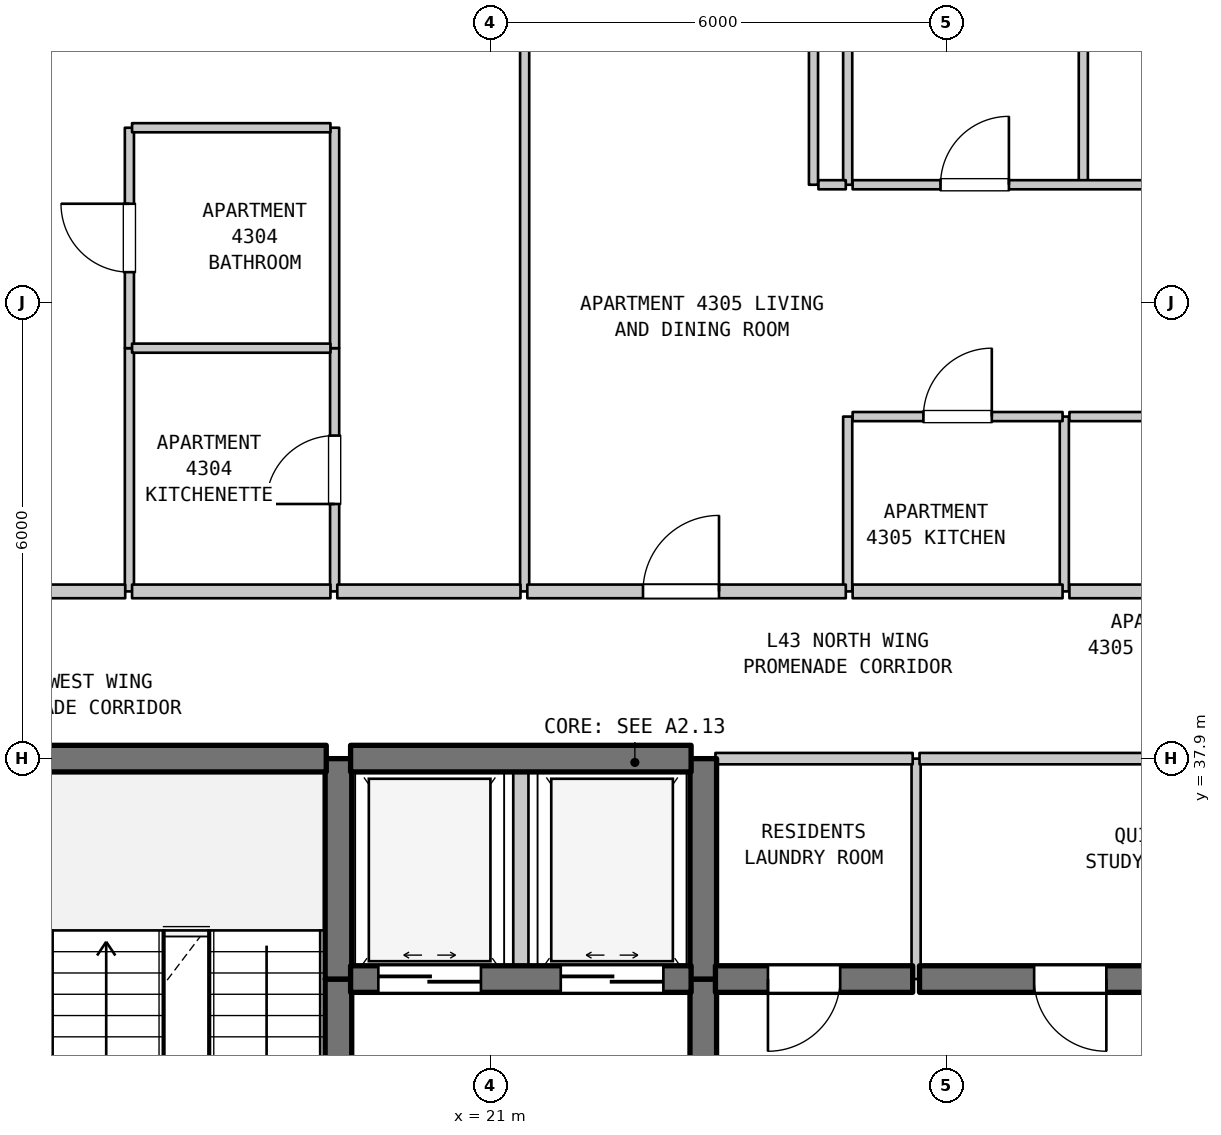
"""IFC4 building model, lengths in metres.
Left out: names, types, materials, properties, quantities, classifications, styles, units other than length and angle.
Written with IfcOpenShell. Run it as: python <this file> out.ifc"""

import sys

from ifc_helpers import new_model, si_unit, direction, frame, frame_2d, origin, place, context, subcontext, project, spatial, rectangle, extrude, element, fill, save


model = new_model("IFC4")
c1 = context("Model", 3, precision=1e-05, world=origin(), true_north=direction((0.0, 1.0)))
c2 = subcontext(c1, "Body", "Model", "MODEL_VIEW")
j1 = project(units=[si_unit("LENGTHUNIT", "METRE"), si_unit("PLANEANGLEUNIT", "RADIAN")], contexts=[c1])
p1 = place(None, origin())
s1 = spatial("IfcSite", under=j1, at=p1, CompositionType="ELEMENT")
p2 = place(p1, origin())
s2 = spatial("IfcBuilding", under=s1, at=p2, CompositionType="ELEMENT")
p3 = place(p2, frame((0.0, 0.0, 176.5)))
s3 = spatial("IfcBuildingStorey", under=s2, at=p3, CompositionType="ELEMENT", Elevation=176.5)
p4 = place(p3, frame((16.25, 40.1, 0.0), z_axis=(0.0, 0.0, 1.0), x_axis=(0.0, 1.0, 0.0)))
e1 = element("IfcWall", 1, at=p4, inside=s3, PredefinedType="PARTITIONING", context=c2, shape_type="SweptSolid", body=[
    extrude(rectangle(XDim=3.2, YDim=0.12, at=frame_2d((1.6, 0.0))), origin(), (0.0, 0.0, 1.0), 3.39),
])
p5 = place(p3, frame((16.25, 43.3, 0.0), z_axis=(0.0, 0.0, 1.0), x_axis=(0.0, 1.0, 0.0)))
e2 = element("IfcWall", 2, at=p5, inside=s3, PredefinedType="PARTITIONING", context=c2, shape_type="SweptSolid", body=[
    extrude(rectangle(XDim=2.9, YDim=0.12, at=frame_2d((1.45, 0.0))), origin(), (0.0, 0.0, 1.0), 3.39),
])
p6 = place(p5, frame((1.0, 0.0, 0.0)))
e3 = element("IfcOpeningElement", 3, at=p6, cuts=e2, PredefinedType="OPENING", context=c2, shape_type="SweptSolid", body=[
    extrude(rectangle(XDim=0.9, YDim=2.1, at=frame_2d((0.45, 1.05))), frame((0.0, 0.07, 0.0), z_axis=(0.0, -1.0, 0.0), x_axis=(1.0, 0.0, 0.0)), (0.0, 0.0, 1.0), 0.14),
])
p7 = place(p3, frame((18.95, 40.1, 0.0), z_axis=(0.0, 0.0, 1.0), x_axis=(0.0, 1.0, 0.0)))
e4 = element("IfcWall", 4, at=p7, inside=s3, PredefinedType="PARTITIONING", context=c2, shape_type="SweptSolid", body=[
    extrude(rectangle(XDim=3.2, YDim=0.12, at=frame_2d((1.6, 0.0))), origin(), (0.0, 0.0, 1.0), 3.39),
])
p8 = place(p7, frame((1.15, 0.0, 0.0)))
e5 = element("IfcOpeningElement", 5, at=p8, cuts=e4, PredefinedType="OPENING", context=c2, shape_type="SweptSolid", body=[
    extrude(rectangle(XDim=0.9, YDim=2.15, at=frame_2d((0.45, 1.075))), frame((0.0, 0.07, 0.0), z_axis=(0.0, -1.0, 0.0), x_axis=(1.0, 0.0, 0.0)), (0.0, 0.0, 1.0), 0.14),
])
p9 = place(p3, frame((18.95, 43.3, 0.0), z_axis=(0.0, 0.0, 1.0), x_axis=(0.0, 1.0, 0.0)))
e6 = element("IfcWall", 6, at=p9, inside=s3, PredefinedType="PARTITIONING", context=c2, shape_type="SweptSolid", body=[
    extrude(rectangle(XDim=2.9, YDim=0.12, at=frame_2d((1.45, 0.0))), origin(), (0.0, 0.0, 1.0), 3.39),
])
p10 = place(p3, frame((19.0, 29.5, 0.0), z_axis=(0.0, 0.0, 1.0), x_axis=(0.0, 1.0, 0.0)))
e7 = element("IfcWall", 7, at=p10, inside=s3, PredefinedType="SHEAR", context=c2, shape_type="SweptSolid", body=[
    extrude(rectangle(XDim=5.5, YDim=0.35, at=frame_2d((2.75, 0.0))), origin(), (0.0, 0.0, 1.0), 3.39),
])
p11 = place(p10, frame((2.025, 0.0, 0.0)))
e8 = element("IfcOpeningElement", 8, at=p11, cuts=e7, PredefinedType="OPENING", context=c2, shape_type="SweptSolid", body=[
    extrude(rectangle(XDim=1.1, YDim=2.15, at=frame_2d((0.55, 1.075))), frame((0.0, 0.185, 0.0), z_axis=(0.0, -1.0, 0.0), x_axis=(1.0, 0.0, 0.0)), (0.0, 0.0, 1.0), 0.37),
])
p12 = place(p3, frame((19.0, 35.0, 0.0), z_axis=(0.0, 0.0, 1.0), x_axis=(0.0, 1.0, 0.0)))
e9 = element("IfcWall", 9, at=p12, inside=s3, PredefinedType="SHEAR", context=c2, shape_type="SweptSolid", body=[
    extrude(rectangle(XDim=2.9, YDim=0.35, at=frame_2d((1.45, 0.0))), origin(), (0.0, 0.0, 1.0), 3.39),
])
p13 = place(p3, frame((21.4, 35.0, 0.0), z_axis=(0.0, 0.0, 1.0), x_axis=(0.0, 1.0, 0.0)))
e10 = element("IfcWall", 10, at=p13, inside=s3, PredefinedType="STANDARD", context=c2, shape_type="SweptSolid", body=[
    extrude(rectangle(XDim=2.9, YDim=0.2, at=frame_2d((1.45, 0.0))), origin(), (0.0, 0.0, 1.0), 3.39),
])
p14 = place(p3, frame((21.45, 40.1, 0.0), z_axis=(0.0, 0.0, 1.0), x_axis=(0.0, 1.0, 0.0)))
e11 = element("IfcWall", 11, at=p14, inside=s3, PredefinedType="PARTITIONING", context=c2, shape_type="SweptSolid", body=[
    extrude(rectangle(XDim=13.79, YDim=0.12, at=frame_2d((6.895, 0.0))), origin(), (0.0, 0.0, 1.0), 3.39),
])
p15 = place(p3, frame((23.8, 31.5, 0.0), z_axis=(0.0, 0.0, 1.0), x_axis=(0.0, 1.0, 0.0)))
e12 = element("IfcWall", 12, at=p15, inside=s3, PredefinedType="SHEAR", context=c2, shape_type="SweptSolid", body=[
    extrude(rectangle(XDim=3.5, YDim=0.35, at=frame_2d((1.75, 0.0))), origin(), (0.0, 0.0, 1.0), 3.39),
])
p16 = place(p15, frame((1.127, 0.0, 0.0)))
e13 = element("IfcOpeningElement", 13, at=p16, cuts=e12, PredefinedType="OPENING", context=c2, shape_type="SweptSolid", body=[
    extrude(rectangle(XDim=1.1, YDim=2.15, at=frame_2d((0.55, 1.075))), frame((0.0, 0.185, 0.0), z_axis=(0.0, -1.0, 0.0), x_axis=(1.0, 0.0, 0.0)), (0.0, 0.0, 1.0), 0.37),
])
p17 = place(p3, frame((23.8, 35.0, 0.0), z_axis=(0.0, 0.0, 1.0), x_axis=(0.0, 1.0, 0.0)))
e14 = element("IfcWall", 14, at=p17, inside=s3, PredefinedType="SHEAR", context=c2, shape_type="SweptSolid", body=[
    extrude(rectangle(XDim=2.9, YDim=0.35, at=frame_2d((1.45, 0.0))), origin(), (0.0, 0.0, 1.0), 3.39),
])
p18 = place(p3, frame((25.25, 45.45, 0.0), z_axis=(0.0, 0.0, 1.0), x_axis=(0.0, 1.0, 0.0)))
e15 = element("IfcWall", 15, at=p18, inside=s3, PredefinedType="PARTITIONING", context=c2, shape_type="SweptSolid", body=[
    extrude(rectangle(XDim=8.44, YDim=0.12, at=frame_2d((4.22, 0.0))), origin(), (0.0, 0.0, 1.0), 3.39),
])
p19 = place(p3, frame((25.7, 40.1, 0.0), z_axis=(0.0, 0.0, 1.0), x_axis=(0.0, 1.0, 0.0)))
e16 = element("IfcWall", 16, at=p19, inside=s3, PredefinedType="PARTITIONING", context=c2, shape_type="SweptSolid", body=[
    extrude(rectangle(XDim=2.3, YDim=0.12, at=frame_2d((1.15, 0.0))), origin(), (0.0, 0.0, 1.0), 3.39),
])
p20 = place(p3, frame((25.7, 45.45, 0.0), z_axis=(0.0, 0.0, 1.0), x_axis=(0.0, 1.0, 0.0)))
e17 = element("IfcWall", 17, at=p20, inside=s3, PredefinedType="PARTITIONING", context=c2, shape_type="SweptSolid", body=[
    extrude(rectangle(XDim=8.44, YDim=0.12, at=frame_2d((4.22, 0.0))), origin(), (0.0, 0.0, 1.0), 3.39),
])
p21 = place(p3, frame((26.6, 35.0, 0.0), z_axis=(0.0, 0.0, 1.0), x_axis=(0.0, 1.0, 0.0)))
e18 = element("IfcWall", 18, at=p21, inside=s3, PredefinedType="PARTITIONING", context=c2, shape_type="SweptSolid", body=[
    extrude(rectangle(XDim=2.9, YDim=0.12, at=frame_2d((1.45, 0.0))), origin(), (0.0, 0.0, 1.0), 3.39),
])
p22 = place(p3, frame((28.55, 40.1, 0.0), z_axis=(0.0, 0.0, 1.0), x_axis=(0.0, 1.0, 0.0)))
e19 = element("IfcWall", 19, at=p22, inside=s3, PredefinedType="PARTITIONING", context=c2, shape_type="SweptSolid", body=[
    extrude(rectangle(XDim=2.3, YDim=0.12, at=frame_2d((1.15, 0.0))), origin(), (0.0, 0.0, 1.0), 3.39),
])
p23 = place(p3, frame((28.8, 45.45, 0.0), z_axis=(0.0, 0.0, 1.0), x_axis=(0.0, 1.0, 0.0)))
e20 = element("IfcWall", 20, at=p23, inside=s3, PredefinedType="PARTITIONING", context=c2, shape_type="SweptSolid", body=[
    extrude(rectangle(XDim=8.44, YDim=0.12, at=frame_2d((4.22, 0.0))), origin(), (0.0, 0.0, 1.0), 3.39),
])
p24 = place(p3, frame((19.16, 35.0, 0.0), z_axis=(0.0, 0.0, 1.0), x_axis=(1.0, 0.0, 0.0)))
e21 = element("IfcWall", 21, at=p24, inside=s3, PredefinedType="SHEAR", context=c2, shape_type="SweptSolid", body=[
    extrude(rectangle(XDim=4.48, YDim=0.35, at=frame_2d((2.24, 0.0))), origin(), (0.0, 0.0, 1.0), 3.39),
])
p25 = place(p24, frame((0.365, 0.0, 0.0)))
e22 = element("IfcOpeningElement", 22, at=p25, cuts=e21, PredefinedType="OPENING", context=c2, shape_type="SweptSolid", body=[
    extrude(rectangle(XDim=1.35, YDim=2.2, at=frame_2d((0.675, 1.1))), frame((0.0, 0.185, 0.0), z_axis=(0.0, -1.0, 0.0), x_axis=(1.0, 0.0, 0.0)), (0.0, 0.0, 1.0), 0.37),
])
p26 = place(p24, frame((2.765, 0.0, 0.0)))
e23 = element("IfcOpeningElement", 23, at=p26, cuts=e21, PredefinedType="OPENING", context=c2, shape_type="SweptSolid", body=[
    extrude(rectangle(XDim=1.35, YDim=2.2, at=frame_2d((0.675, 1.1))), frame((0.0, 0.185, 0.0), z_axis=(0.0, -1.0, 0.0), x_axis=(1.0, 0.0, 0.0)), (0.0, 0.0, 1.0), 0.37),
])
p27 = place(p3, frame((23.96, 35.0, 0.0), z_axis=(0.0, 0.0, 1.0), x_axis=(1.0, 0.0, 0.0)))
e24 = element("IfcWall", 24, at=p27, inside=s3, PredefinedType="SHEAR", context=c2, shape_type="SweptSolid", body=[
    extrude(rectangle(XDim=2.595, YDim=0.35, at=frame_2d((1.297, 0.0))), origin(), (0.0, 0.0, 1.0), 3.39),
])
p28 = place(p27, frame((0.691, 0.0, 0.0)))
e25 = element("IfcOpeningElement", 25, at=p28, cuts=e24, PredefinedType="OPENING", context=c2, shape_type="SweptSolid", body=[
    extrude(rectangle(XDim=0.95, YDim=2.15, at=frame_2d((0.475, 1.075))), frame((0.0, 0.185, 0.0), z_axis=(0.0, -1.0, 0.0), x_axis=(1.0, 0.0, 0.0)), (0.0, 0.0, 1.0), 0.37),
])
p29 = place(p3, frame((26.645, 35.0, 0.0), z_axis=(0.0, 0.0, 1.0), x_axis=(1.0, 0.0, 0.0)))
e26 = element("IfcWall", 26, at=p29, inside=s3, PredefinedType="SHEAR", context=c2, shape_type="SweptSolid", body=[
    extrude(rectangle(XDim=3.995, YDim=0.35, at=frame_2d((1.998, 0.0))), origin(), (0.0, 0.0, 1.0), 3.39),
])
p30 = place(p29, frame((1.508, 0.0, 0.0)))
e27 = element("IfcOpeningElement", 27, at=p30, cuts=e26, PredefinedType="OPENING", context=c2, shape_type="SweptSolid", body=[
    extrude(rectangle(XDim=0.95, YDim=2.15, at=frame_2d((0.475, 1.075))), frame((0.0, 0.185, 0.0), z_axis=(0.0, -1.0, 0.0), x_axis=(1.0, 0.0, 0.0)), (0.0, 0.0, 1.0), 0.37),
])
p31 = place(p3, frame((15.16, 37.9, 0.0), z_axis=(0.0, 0.0, 1.0), x_axis=(1.0, 0.0, 0.0)))
e28 = element("IfcWall", 28, at=p31, inside=s3, PredefinedType="SHEAR", context=c2, shape_type="SweptSolid", body=[
    extrude(rectangle(XDim=3.68, YDim=0.35, at=frame_2d((1.84, 0.0))), origin(), (0.0, 0.0, 1.0), 3.39),
])
p32 = place(p3, frame((19.16, 37.9, 0.0), z_axis=(0.0, 0.0, 1.0), x_axis=(1.0, 0.0, 0.0)))
e29 = element("IfcWall", 29, at=p32, inside=s3, PredefinedType="SHEAR", context=c2, shape_type="SweptSolid", body=[
    extrude(rectangle(XDim=4.48, YDim=0.35, at=frame_2d((2.24, 0.0))), origin(), (0.0, 0.0, 1.0), 3.39),
])
p33 = place(p3, frame((23.96, 37.9, 0.0), z_axis=(0.0, 0.0, 1.0), x_axis=(1.0, 0.0, 0.0)))
e30 = element("IfcWall", 30, at=p33, inside=s3, PredefinedType="STANDARD", context=c2, shape_type="SweptSolid", body=[
    extrude(rectangle(XDim=2.595, YDim=0.15, at=frame_2d((1.297, 0.0))), origin(), (0.0, 0.0, 1.0), 2.89),
])
p34 = place(p3, frame((26.645, 37.9, 0.0), z_axis=(0.0, 0.0, 1.0), x_axis=(1.0, 0.0, 0.0)))
e31 = element("IfcWall", 31, at=p34, inside=s3, PredefinedType="STANDARD", context=c2, shape_type="SweptSolid", body=[
    extrude(rectangle(XDim=4.095, YDim=0.15, at=frame_2d((2.047, 0.0))), origin(), (0.0, 0.0, 1.0), 2.89),
])
p35 = place(p3, frame((12.875, 40.1, 0.0), z_axis=(0.0, 0.0, 1.0), x_axis=(1.0, 0.0, 0.0)))
e32 = element("IfcWall", 32, at=p35, inside=s3, PredefinedType="STANDARD", context=c2, shape_type="SweptSolid", body=[
    extrude(rectangle(XDim=3.32, YDim=0.18, at=frame_2d((1.66, 0.0))), origin(), (0.0, 0.0, 1.0), 3.39),
])
p36 = place(p35, frame((1.071, 0.0, 0.0)))
e33 = element("IfcOpeningElement", 33, at=p36, cuts=e32, PredefinedType="OPENING", context=c2, shape_type="SweptSolid", body=[
    extrude(rectangle(XDim=1.0, YDim=2.15, at=frame_2d((0.5, 1.075))), frame((0.0, 0.1, 0.0), z_axis=(0.0, -1.0, 0.0), x_axis=(1.0, 0.0, 0.0)), (0.0, 0.0, 1.0), 0.2),
])
p37 = place(p3, frame((16.285, 40.1, 0.0), z_axis=(0.0, 0.0, 1.0), x_axis=(1.0, 0.0, 0.0)))
e34 = element("IfcWall", 34, at=p37, inside=s3, PredefinedType="STANDARD", context=c2, shape_type="SweptSolid", body=[
    extrude(rectangle(XDim=2.61, YDim=0.18, at=frame_2d((1.305, 0.0))), origin(), (0.0, 0.0, 1.0), 3.39),
])
p38 = place(p3, frame((18.985, 40.1, 0.0), z_axis=(0.0, 0.0, 1.0), x_axis=(1.0, 0.0, 0.0)))
e35 = element("IfcWall", 35, at=p38, inside=s3, PredefinedType="STANDARD", context=c2, shape_type="SweptSolid", body=[
    extrude(rectangle(XDim=2.41, YDim=0.18, at=frame_2d((1.205, 0.0))), origin(), (0.0, 0.0, 1.0), 3.39),
])
p39 = place(p3, frame((21.485, 40.1, 0.0), z_axis=(0.0, 0.0, 1.0), x_axis=(1.0, 0.0, 0.0)))
e36 = element("IfcWall", 36, at=p39, inside=s3, PredefinedType="STANDARD", context=c2, shape_type="SweptSolid", body=[
    extrude(rectangle(XDim=4.19, YDim=0.18, at=frame_2d((2.095, 0.0))), origin(), (0.0, 0.0, 1.0), 3.39),
])
p40 = place(p39, frame((1.522, 0.0, 0.0)))
e37 = element("IfcOpeningElement", 37, at=p40, cuts=e36, PredefinedType="OPENING", context=c2, shape_type="SweptSolid", body=[
    extrude(rectangle(XDim=1.0, YDim=2.15, at=frame_2d((0.5, 1.075))), frame((0.0, 0.1, 0.0), z_axis=(0.0, -1.0, 0.0), x_axis=(1.0, 0.0, 0.0)), (0.0, 0.0, 1.0), 0.2),
])
p41 = place(p3, frame((25.765, 40.1, 0.0), z_axis=(0.0, 0.0, 1.0), x_axis=(1.0, 0.0, 0.0)))
e38 = element("IfcWall", 38, at=p41, inside=s3, PredefinedType="STANDARD", context=c2, shape_type="SweptSolid", body=[
    extrude(rectangle(XDim=2.762, YDim=0.18, at=frame_2d((1.381, 0.0))), origin(), (0.0, 0.0, 1.0), 3.39),
])
p42 = place(p3, frame((28.617, 40.1, 0.0), z_axis=(0.0, 0.0, 1.0), x_axis=(1.0, 0.0, 0.0)))
e39 = element("IfcWall", 39, at=p42, inside=s3, PredefinedType="STANDARD", context=c2, shape_type="SweptSolid", body=[
    extrude(rectangle(XDim=3.258, YDim=0.18, at=frame_2d((1.629, 0.0))), origin(), (0.0, 0.0, 1.0), 3.39),
])
p43 = place(p3, frame((25.765, 42.4, 0.0), z_axis=(0.0, 0.0, 1.0), x_axis=(1.0, 0.0, 0.0)))
e40 = element("IfcWall", 40, at=p43, inside=s3, PredefinedType="PARTITIONING", context=c2, shape_type="SweptSolid", body=[
    extrude(rectangle(XDim=2.762, YDim=0.12, at=frame_2d((1.381, 0.0))), origin(), (0.0, 0.0, 1.0), 3.39),
])
p44 = place(p43, frame((0.931, 0.0, 0.0)))
e41 = element("IfcOpeningElement", 41, at=p44, cuts=e40, PredefinedType="OPENING", context=c2, shape_type="SweptSolid", body=[
    extrude(rectangle(XDim=0.9, YDim=2.15, at=frame_2d((0.45, 1.075))), frame((0.0, 0.07, 0.0), z_axis=(0.0, -1.0, 0.0), x_axis=(1.0, 0.0, 0.0)), (0.0, 0.0, 1.0), 0.14),
])
p45 = place(p3, frame((28.617, 42.4, 0.0), z_axis=(0.0, 0.0, 1.0), x_axis=(1.0, 0.0, 0.0)))
e42 = element("IfcWall", 42, at=p45, inside=s3, PredefinedType="PARTITIONING", context=c2, shape_type="SweptSolid", body=[
    extrude(rectangle(XDim=3.258, YDim=0.12, at=frame_2d((1.629, 0.0))), origin(), (0.0, 0.0, 1.0), 3.39),
])
p46 = place(p45, frame((1.105, 0.0, 0.0)))
e43 = element("IfcOpeningElement", 43, at=p46, cuts=e42, PredefinedType="OPENING", context=c2, shape_type="SweptSolid", body=[
    extrude(rectangle(XDim=0.9, YDim=2.1, at=frame_2d((0.45, 1.05))), frame((0.0, 0.07, 0.0), z_axis=(0.0, -1.0, 0.0), x_axis=(1.0, 0.0, 0.0)), (0.0, 0.0, 1.0), 0.14),
])
p47 = place(p3, frame((16.285, 43.3, 0.0), z_axis=(0.0, 0.0, 1.0), x_axis=(1.0, 0.0, 0.0)))
e44 = element("IfcWall", 44, at=p47, inside=s3, PredefinedType="PARTITIONING", context=c2, shape_type="SweptSolid", body=[
    extrude(rectangle(XDim=2.61, YDim=0.12, at=frame_2d((1.305, 0.0))), origin(), (0.0, 0.0, 1.0), 3.39),
])
p48 = place(p3, frame((25.315, 45.45, 0.0), z_axis=(0.0, 0.0, 1.0), x_axis=(1.0, 0.0, 0.0)))
e45 = element("IfcWall", 45, at=p48, inside=s3, PredefinedType="PARTITIONING", context=c2, shape_type="SweptSolid", body=[
    extrude(rectangle(XDim=0.36, YDim=0.12, at=frame_2d((0.18, 0.0))), origin(), (0.0, 0.0, 1.0), 3.39),
])
p49 = place(p3, frame((25.765, 45.45, 0.0), z_axis=(0.0, 0.0, 1.0), x_axis=(1.0, 0.0, 0.0)))
e46 = element("IfcWall", 46, at=p49, inside=s3, PredefinedType="PARTITIONING", context=c2, shape_type="SweptSolid", body=[
    extrude(rectangle(XDim=6.11, YDim=0.12, at=frame_2d((3.055, 0.0))), origin(), (0.0, 0.0, 1.0), 3.39),
])
p50 = place(p49, frame((1.156, 0.0, 0.0)))
e47 = element("IfcOpeningElement", 47, at=p50, cuts=e46, PredefinedType="OPENING", context=c2, shape_type="SweptSolid", body=[
    extrude(rectangle(XDim=0.9, YDim=2.15, at=frame_2d((0.45, 1.075))), frame((0.0, 0.07, 0.0), z_axis=(0.0, -1.0, 0.0), x_axis=(1.0, 0.0, 0.0)), (0.0, 0.0, 1.0), 0.14),
])
p51 = place(p49, frame((3.906, 0.0, 0.0)))
e48 = element("IfcOpeningElement", 48, at=p51, cuts=e46, PredefinedType="OPENING", context=c2, shape_type="SweptSolid", body=[
    extrude(rectangle(XDim=0.9, YDim=2.15, at=frame_2d((0.45, 1.075))), frame((0.0, 0.07, 0.0), z_axis=(0.0, -1.0, 0.0), x_axis=(1.0, 0.0, 0.0)), (0.0, 0.0, 1.0), 0.14),
])
p52 = place(p3, frame((16.285, 46.2, 0.0), z_axis=(0.0, 0.0, 1.0), x_axis=(1.0, 0.0, 0.0)))
e49 = element("IfcWall", 49, at=p52, inside=s3, PredefinedType="PARTITIONING", context=c2, shape_type="SweptSolid", body=[
    extrude(rectangle(XDim=2.61, YDim=0.12, at=frame_2d((1.305, 0.0))), origin(), (0.0, 0.0, 1.0), 3.39),
])
p53 = place(p6, origin())
e50 = element("IfcDoor", 50, at=p53, inside=s3, OperationType="SINGLE_SWING_RIGHT", PredefinedType="DOOR", context=c2, shape_type="SweptSolid", body=[
    extrude(rectangle(XDim=0.9, YDim=2.1, at=frame_2d((0.45, 1.05))), frame((0.0, 0.025, 0.0), z_axis=(0.0, -1.0, 0.0), x_axis=(1.0, 0.0, 0.0)), (0.0, 0.0, 1.0), 0.05),
])
fill(e3, e50)
p54 = place(p8, origin())
e51 = element("IfcDoor", 51, at=p54, inside=s3, OperationType="SINGLE_SWING_LEFT", PredefinedType="DOOR", context=c2, shape_type="SweptSolid", body=[
    extrude(rectangle(XDim=0.9, YDim=2.15, at=frame_2d((0.45, 1.075))), frame((0.0, 0.025, 0.0), z_axis=(0.0, -1.0, 0.0), x_axis=(1.0, 0.0, 0.0)), (0.0, 0.0, 1.0), 0.05),
])
fill(e5, e51)
p55 = place(p25, origin())
e52 = element("IfcDoor", 52, at=p55, inside=s3, OperationType="DOUBLE_DOOR_SLIDING", PredefinedType="DOOR", context=c2, shape_type="SweptSolid", body=[
    extrude(rectangle(XDim=1.35, YDim=2.2, at=frame_2d((0.675, 1.1))), frame((0.0, 0.025, 0.0), z_axis=(0.0, -1.0, 0.0), x_axis=(1.0, 0.0, 0.0)), (0.0, 0.0, 1.0), 0.05),
])
fill(e22, e52)
p56 = place(p26, origin())
e53 = element("IfcDoor", 53, at=p56, inside=s3, OperationType="DOUBLE_DOOR_SLIDING", PredefinedType="DOOR", context=c2, shape_type="SweptSolid", body=[
    extrude(rectangle(XDim=1.35, YDim=2.2, at=frame_2d((0.675, 1.1))), frame((0.0, 0.025, 0.0), z_axis=(0.0, -1.0, 0.0), x_axis=(1.0, 0.0, 0.0)), (0.0, 0.0, 1.0), 0.05),
])
fill(e23, e53)
p57 = place(p28, frame((0.95, 0.0, 0.0), z_axis=(0.0, 0.0, 1.0), x_axis=(-1.0, 0.0, 0.0)))
e54 = element("IfcDoor", 54, at=p57, inside=s3, OperationType="SINGLE_SWING_LEFT", PredefinedType="DOOR", context=c2, shape_type="SweptSolid", body=[
    extrude(rectangle(XDim=0.95, YDim=2.15, at=frame_2d((0.475, 1.075))), frame((0.0, 0.025, 0.0), z_axis=(0.0, -1.0, 0.0), x_axis=(1.0, 0.0, 0.0)), (0.0, 0.0, 1.0), 0.05),
])
fill(e25, e54)
p58 = place(p30, frame((0.95, 0.0, 0.0), z_axis=(0.0, 0.0, 1.0), x_axis=(-1.0, 0.0, 0.0)))
e55 = element("IfcDoor", 55, at=p58, inside=s3, OperationType="SINGLE_SWING_RIGHT", PredefinedType="DOOR", context=c2, shape_type="SweptSolid", body=[
    extrude(rectangle(XDim=0.95, YDim=2.15, at=frame_2d((0.475, 1.075))), frame((0.0, 0.025, 0.0), z_axis=(0.0, -1.0, 0.0), x_axis=(1.0, 0.0, 0.0)), (0.0, 0.0, 1.0), 0.05),
])
fill(e27, e55)
p59 = place(p40, origin())
e56 = element("IfcDoor", 56, at=p59, inside=s3, OperationType="SINGLE_SWING_RIGHT", PredefinedType="DOOR", context=c2, shape_type="SweptSolid", body=[
    extrude(rectangle(XDim=1.0, YDim=2.15, at=frame_2d((0.5, 1.075))), frame((0.0, 0.025, 0.0), z_axis=(0.0, -1.0, 0.0), x_axis=(1.0, 0.0, 0.0)), (0.0, 0.0, 1.0), 0.05),
])
fill(e37, e56)
p60 = place(p44, origin())
e57 = element("IfcDoor", 57, at=p60, inside=s3, OperationType="SINGLE_SWING_RIGHT", PredefinedType="DOOR", context=c2, shape_type="SweptSolid", body=[
    extrude(rectangle(XDim=0.9, YDim=2.15, at=frame_2d((0.45, 1.075))), frame((0.0, 0.025, 0.0), z_axis=(0.0, -1.0, 0.0), x_axis=(1.0, 0.0, 0.0)), (0.0, 0.0, 1.0), 0.05),
])
fill(e41, e57)
p61 = place(p50, origin())
e58 = element("IfcDoor", 58, at=p61, inside=s3, OperationType="SINGLE_SWING_RIGHT", PredefinedType="DOOR", context=c2, shape_type="SweptSolid", body=[
    extrude(rectangle(XDim=0.9, YDim=2.15, at=frame_2d((0.45, 1.075))), frame((0.0, 0.025, 0.0), z_axis=(0.0, -1.0, 0.0), x_axis=(1.0, 0.0, 0.0)), (0.0, 0.0, 1.0), 0.05),
])
fill(e47, e58)
save(model, sys.argv[1])
